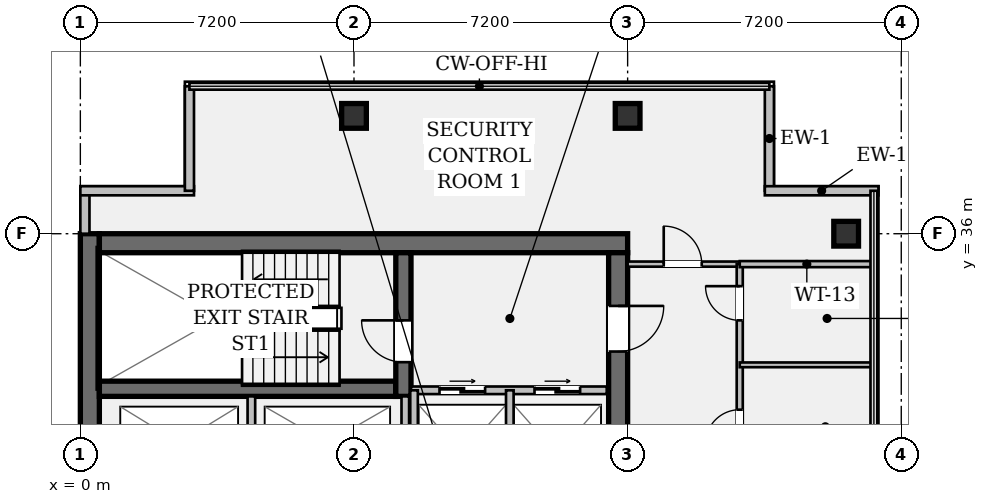
"""IFC4 building model, lengths in metres.
Left out: names, types, materials, properties, quantities, classifications, styles, units other than length and angle.
Written with IfcOpenShell. Run it as: python <this file> out.ifc"""

import sys

from ifc_helpers import new_model, si_unit, direction, frame, frame_2d, origin, origin_2d, place, context, subcontext, project, spatial, rectangle, hollow_rectangle, extrude, element, fill, save


model = new_model("IFC4")
c1 = context("Model", 3, precision=1e-05, world=origin(), true_north=direction((0.0, 1.0)))
c2 = subcontext(c1, "Body", "Model", "MODEL_VIEW")
j1 = project(units=[si_unit("LENGTHUNIT", "METRE"), si_unit("PLANEANGLEUNIT", "RADIAN")], contexts=[c1])
p1 = place(None, origin())
s1 = spatial("IfcSite", under=j1, at=p1, CompositionType="ELEMENT")
p2 = place(p1, origin())
s2 = spatial("IfcBuilding", under=s1, at=p2, CompositionType="ELEMENT")
p3 = place(p2, frame((0.0, 0.0, 241.15)))
s3 = spatial("IfcBuildingStorey", under=s2, at=p3, CompositionType="ELEMENT", Elevation=241.15)
p4 = place(p3, frame((0.25, 7.2, 0.0), z_axis=(0.0, 0.0, 1.0), x_axis=(0.0, 1.0, 0.0)))
e1 = element("IfcWall", 1, at=p4, inside=s3, PredefinedType="SHEAR", context=c2, shape_type="SweptSolid", body=[
    extrude(rectangle(XDim=28.8, YDim=0.5, at=frame_2d((14.4, 0.0))), origin(), (0.0, 0.0, 1.0), 3.24),
])
p5 = place(p3, frame((0.5, 35.75, 0.0), z_axis=(0.0, 0.0, 1.0), x_axis=(1.0, 0.0, 0.0)))
e2 = element("IfcWall", 2, at=p5, inside=s3, PredefinedType="SHEAR", context=c2, shape_type="SweptSolid", body=[
    extrude(rectangle(XDim=13.9, YDim=0.5, at=frame_2d((6.95, 0.0))), origin(), (0.0, 0.0, 1.0), 3.24),
])
p6 = place(p3, frame((14.15, 35.5, 0.0), z_axis=(0.0, 0.0, 1.0), x_axis=(0.0, -1.0, 0.0)))
e3 = element("IfcWall", 3, at=p6, inside=s3, PredefinedType="SHEAR", context=c2, shape_type="SweptSolid", body=[
    extrude(rectangle(XDim=27.8, YDim=0.5, at=frame_2d((13.9, 0.0))), origin(), (0.0, 0.0, 1.0), 3.24),
])
p7 = place(p6, frame((1.4, 0.0, 0.0)))
e4 = element("IfcOpeningElement", 4, at=p7, cuts=e3, PredefinedType="OPENING", context=c2, shape_type="SweptSolid", body=[
    extrude(rectangle(XDim=1.2, YDim=2.15, at=frame_2d((0.6, 1.075))), frame((0.0, 0.262, 0.0), z_axis=(0.0, -1.0, 0.0), x_axis=(1.0, 0.0, 0.0)), (0.0, 0.0, 1.0), 0.524),
])
p8 = place(p6, frame((25.35, 0.0, 0.0)))
e5 = element("IfcOpeningElement", 5, at=p8, cuts=e3, PredefinedType="OPENING", context=c2, shape_type="SweptSolid", body=[
    extrude(rectangle(XDim=1.2, YDim=2.15, at=frame_2d((0.6, 1.075))), frame((0.0, 0.262, 0.0), z_axis=(0.0, -1.0, 0.0), x_axis=(1.0, 0.0, 0.0)), (0.0, 0.0, 1.0), 0.524),
])
p9 = place(p6, frame((14.7, 0.0, 0.0)))
e6 = element("IfcOpeningElement", 6, at=p9, cuts=e3, PredefinedType="OPENING", context=c2, shape_type="SweptSolid", body=[
    extrude(rectangle(XDim=1.6, YDim=2.2, at=frame_2d((0.8, 1.1))), frame((0.0, 0.262, 0.0), z_axis=(0.0, -1.0, 0.0), x_axis=(1.0, 0.0, 0.0)), (0.0, 0.0, 1.0), 0.524),
])
p10 = place(p3, frame((0.5, 31.92, 0.0), z_axis=(0.0, 0.0, 1.0), x_axis=(1.0, 0.0, 0.0)))
e7 = element("IfcWall", 7, at=p10, inside=s3, PredefinedType="SHEAR", context=c2, shape_type="SweptSolid", body=[
    extrude(rectangle(XDim=7.8, YDim=0.4, at=frame_2d((3.9, 0.0))), origin(), (0.0, 0.0, 1.0), 3.24),
])
p11 = place(p3, frame((8.5, 31.72, 0.0), z_axis=(0.0, 0.0, 1.0), x_axis=(0.0, 1.0, 0.0)))
e8 = element("IfcWall", 8, at=p11, inside=s3, PredefinedType="SHEAR", context=c2, shape_type="SweptSolid", body=[
    extrude(rectangle(XDim=3.78, YDim=0.4, at=frame_2d((1.89, 0.0))), origin(), (0.0, 0.0, 1.0), 3.24),
])
p12 = place(p11, frame((0.9, 0.0, 0.0)))
e9 = element("IfcOpeningElement", 9, at=p12, cuts=e8, PredefinedType="OPENING", context=c2, shape_type="SweptSolid", body=[
    extrude(rectangle(XDim=1.1, YDim=2.15, at=frame_2d((0.55, 1.075))), frame((0.0, 0.212, 0.0), z_axis=(0.0, -1.0, 0.0), x_axis=(1.0, 0.0, 0.0)), (0.0, 0.0, 1.0), 0.424),
])
for number, where, z_axis, x_axis in (
    (10, (7.2, 39.1, 0.0), (0.0, 0.0, 1.0), (1.0, 0.0, 0.0)),
    (11, (14.4, 39.1, 0.0), (0.0, 0.0, 1.0), (1.0, 0.0, 0.0)),
    (12, (20.15, 36.0, 0.0), (0.0, 0.0, 1.0), (1.0, 0.0, 0.0)),
):
    element("IfcColumn", number, at=place(p3, frame(where, z_axis=z_axis, x_axis=x_axis)), inside=s3, PredefinedType="COLUMN", context=c2, shape_type="SweptSolid", body=[
        extrude(hollow_rectangle(XDim=0.65, YDim=0.65, WallThickness=0.04, at=origin_2d()), origin(), (0.0, 0.0, 1.0), 3.24),
    ])
p13 = place(p3, frame((0.12, 36.0, 0.0), z_axis=(0.0, 0.0, 1.0), x_axis=(0.0, 1.0, 0.0)))
e13 = element("IfcWall", 13, at=p13, inside=s3, PredefinedType="STANDARD", context=c2, shape_type="SweptSolid", body=[
    extrude(rectangle(XDim=1.13, YDim=0.24, at=frame_2d((0.565, 0.0))), origin(), (0.0, 0.0, 1.0), 3.24),
])
p14 = place(p3, frame((0.0, 37.13, 0.0), z_axis=(0.0, 0.0, 1.0), x_axis=(1.0, 0.0, 0.0)))
e14 = element("IfcWall", 14, at=p14, inside=s3, PredefinedType="STANDARD", context=c2, shape_type="SweptSolid", body=[
    extrude(rectangle(XDim=2.99, YDim=0.24, at=frame_2d((1.495, 0.0))), origin(), (0.0, 0.0, 1.0), 3.24),
])
for number, where, z_axis, x_axis in (
    (15, (2.87, 37.13, 0.0), (0.0, 0.0, 1.0), (0.0, 1.0, 0.0)),
    (16, (18.13, 39.88, 0.0), (0.0, 0.0, 1.0), (0.0, -1.0, 0.0)),
):
    element("IfcWall", number, at=place(p3, frame(where, z_axis=z_axis, x_axis=x_axis)), inside=s3, PredefinedType="STANDARD", context=c2, shape_type="SweptSolid", body=[
        extrude(rectangle(XDim=2.75, YDim=0.24, at=frame_2d((1.375, 0.0))), origin(), (0.0, 0.0, 1.0), 3.24),
    ])
p15 = place(p3, frame((18.01, 37.13, 0.0), z_axis=(0.0, 0.0, 1.0), x_axis=(1.0, 0.0, 0.0)))
e17 = element("IfcWall", 17, at=p15, inside=s3, PredefinedType="STANDARD", context=c2, shape_type="SweptSolid", body=[
    extrude(rectangle(XDim=2.99, YDim=0.24, at=frame_2d((1.495, 0.0))), origin(), (0.0, 0.0, 1.0), 3.24),
])
p16 = place(p3, frame((8.7, 31.88, 0.0), z_axis=(0.0, 0.0, 1.0), x_axis=(1.0, 0.0, 0.0)))
e18 = element("IfcWall", 18, at=p16, inside=s3, PredefinedType="PARTITIONING", context=c2, shape_type="SweptSolid", body=[
    extrude(rectangle(XDim=5.15, YDim=0.2, at=frame_2d((2.575, 0.0))), origin(), (0.0, 0.0, 1.0), 3.24),
])
p17 = place(p16, frame((0.75, 0.0, 0.0)))
e19 = element("IfcOpeningElement", 19, at=p17, cuts=e18, PredefinedType="OPENING", context=c2, shape_type="SweptSolid", body=[
    extrude(rectangle(XDim=1.2, YDim=2.2, at=frame_2d((0.6, 1.1))), frame((0.0, 0.112, 0.0), z_axis=(0.0, -1.0, 0.0), x_axis=(1.0, 0.0, 0.0)), (0.0, 0.0, 1.0), 0.224),
])
p18 = place(p16, frame((3.25, 0.0, 0.0)))
e20 = element("IfcOpeningElement", 20, at=p18, cuts=e18, PredefinedType="OPENING", context=c2, shape_type="SweptSolid", body=[
    extrude(rectangle(XDim=1.2, YDim=2.2, at=frame_2d((0.6, 1.1))), frame((0.0, 0.112, 0.0), z_axis=(0.0, -1.0, 0.0), x_axis=(1.0, 0.0, 0.0)), (0.0, 0.0, 1.0), 0.224),
])
for number, where, z_axis, x_axis in (
    (21, (8.78, 28.78, 0.0), (0.0, 0.0, 1.0), (0.0, 1.0, 0.0)),
    (22, (11.3, 28.78, 0.0), (0.0, 0.0, 1.0), (0.0, 1.0, 0.0)),
):
    element("IfcWall", number, at=place(p3, frame(where, z_axis=z_axis, x_axis=x_axis)), inside=s3, PredefinedType="PARTITIONING", context=c2, shape_type="SweptSolid", body=[
        extrude(rectangle(XDim=3.1, YDim=0.2, at=frame_2d((1.55, 0.0))), origin(), (0.0, 0.0, 1.0), 3.24),
    ])
for number, where, z_axis, x_axis in (
    (23, (4.5, 28.78, 0.0), (0.0, 0.0, 1.0), (0.0, 1.0, 0.0)),
    (24, (8.55, 28.78, 0.0), (0.0, 0.0, 1.0), (0.0, 1.0, 0.0)),
):
    element("IfcWall", number, at=place(p3, frame(where, z_axis=z_axis, x_axis=x_axis)), inside=s3, PredefinedType="PARTITIONING", context=c2, shape_type="SweptSolid", body=[
        extrude(rectangle(XDim=2.94, YDim=0.2, at=frame_2d((1.47, 0.0))), origin(), (0.0, 0.0, 1.0), 3.24),
    ])
p19 = place(p3, frame((14.4, 35.2, 0.0), z_axis=(0.0, 0.0, 1.0), x_axis=(1.0, 0.0, 0.0)))
e25 = element("IfcWall", 25, at=p19, inside=s3, PredefinedType="PARTITIONING", context=c2, shape_type="SweptSolid", body=[
    extrude(rectangle(XDim=2.95, YDim=0.135, at=frame_2d((1.475, 0.0))), origin(), (0.0, 0.0, 1.0), 2.808),
])
p20 = place(p19, frame((0.95, 0.0, 0.0)))
e26 = element("IfcOpeningElement", 26, at=p20, cuts=e25, PredefinedType="OPENING", context=c2, shape_type="SweptSolid", body=[
    extrude(rectangle(XDim=1.0, YDim=2.15, at=frame_2d((0.5, 1.075))), frame((0.0, 0.08, 0.0), z_axis=(0.0, -1.0, 0.0), x_axis=(1.0, 0.0, 0.0)), (0.0, 0.0, 1.0), 0.159),
])
p21 = place(p3, frame((17.35, 12.35, 0.0), z_axis=(0.0, 0.0, 1.0), x_axis=(0.0, 1.0, 0.0)))
e27 = element("IfcWall", 27, at=p21, inside=s3, PredefinedType="PARTITIONING", context=c2, shape_type="SweptSolid", body=[
    extrude(rectangle(XDim=22.85, YDim=0.16, at=frame_2d((11.425, 0.0))), origin(), (0.0, 0.0, 1.0), 2.676),
])
p22 = place(p21, frame((11.63, 0.0, 0.0)))
e28 = element("IfcOpeningElement", 28, at=p22, cuts=e27, PredefinedType="OPENING", context=c2, shape_type="SweptSolid", body=[
    extrude(rectangle(XDim=0.9, YDim=2.15, at=frame_2d((0.45, 1.075))), frame((0.0, 0.092, 0.0), z_axis=(0.0, -1.0, 0.0), x_axis=(1.0, 0.0, 0.0)), (0.0, 0.0, 1.0), 0.184),
])
p23 = place(p21, frame((14.88, 0.0, 0.0)))
e29 = element("IfcOpeningElement", 29, at=p23, cuts=e27, PredefinedType="OPENING", context=c2, shape_type="SweptSolid", body=[
    extrude(rectangle(XDim=0.9, YDim=2.15, at=frame_2d((0.45, 1.075))), frame((0.0, 0.092, 0.0), z_axis=(0.0, -1.0, 0.0), x_axis=(1.0, 0.0, 0.0)), (0.0, 0.0, 1.0), 0.184),
])
p24 = place(p21, frame((18.12, 0.0, 0.0)))
e30 = element("IfcOpeningElement", 30, at=p24, cuts=e27, PredefinedType="OPENING", context=c2, shape_type="SweptSolid", body=[
    extrude(rectangle(XDim=0.9, YDim=2.15, at=frame_2d((0.45, 1.075))), frame((0.0, 0.092, 0.0), z_axis=(0.0, -1.0, 0.0), x_axis=(1.0, 0.0, 0.0)), (0.0, 0.0, 1.0), 0.184),
])
p25 = place(p21, frame((21.37, 0.0, 0.0)))
e31 = element("IfcOpeningElement", 31, at=p25, cuts=e27, PredefinedType="OPENING", context=c2, shape_type="SweptSolid", body=[
    extrude(rectangle(XDim=0.9, YDim=2.15, at=frame_2d((0.45, 1.075))), frame((0.0, 0.092, 0.0), z_axis=(0.0, -1.0, 0.0), x_axis=(1.0, 0.0, 0.0)), (0.0, 0.0, 1.0), 0.184),
])
p26 = place(p3, frame((17.35, 35.2, 0.0), z_axis=(0.0, 0.0, 1.0), x_axis=(1.0, 0.0, 0.0)))
e32 = element("IfcWall", 32, at=p26, inside=s3, PredefinedType="PARTITIONING", context=c2, shape_type="SweptSolid", body=[
    extrude(rectangle(XDim=3.53, YDim=0.16, at=frame_2d((1.765, 0.0))), origin(), (0.0, 0.0, 1.0), 2.808),
])
p27 = place(p3, frame((20.9, 22.7, 0.0), z_axis=(0.0, 0.0, 1.0), x_axis=(0.0, 1.0, 0.0)))
e33 = element("IfcWall", 33, at=p27, inside=s3, PredefinedType="PARTITIONING", context=c2, shape_type="SweptSolid", body=[
    extrude(rectangle(XDim=12.5, YDim=0.135, at=frame_2d((6.25, 0.0))), origin(), (0.0, 0.0, 1.0), 3.24),
])
p28 = place(p3, frame((17.35, 32.55, 0.0), z_axis=(0.0, 0.0, 1.0), x_axis=(1.0, 0.0, 0.0)))
e34 = element("IfcWall", 34, at=p28, inside=s3, PredefinedType="PARTITIONING", context=c2, shape_type="SweptSolid", body=[
    extrude(rectangle(XDim=3.55, YDim=0.125, at=frame_2d((1.775, 0.0))), origin(), (0.0, 0.0, 1.0), 2.808),
])
p29 = place(p12, origin())
e35 = element("IfcDoor", 35, at=p29, inside=s3, OperationType="SINGLE_SWING_RIGHT", PredefinedType="DOOR", context=c2, shape_type="SweptSolid", body=[
    extrude(rectangle(XDim=1.1, YDim=2.15, at=frame_2d((0.55, 1.075))), frame((0.0, 0.025, 0.0), z_axis=(0.0, -1.0, 0.0), x_axis=(1.0, 0.0, 0.0)), (0.0, 0.0, 1.0), 0.05),
])
fill(e9, e35)
p30 = place(p7, origin())
e36 = element("IfcDoor", 36, at=p30, inside=s3, OperationType="SINGLE_SWING_LEFT", PredefinedType="DOOR", context=c2, shape_type="SweptSolid", body=[
    extrude(rectangle(XDim=1.2, YDim=2.15, at=frame_2d((0.6, 1.075))), frame((0.0, 0.025, 0.0), z_axis=(0.0, -1.0, 0.0), x_axis=(1.0, 0.0, 0.0)), (0.0, 0.0, 1.0), 0.05),
])
fill(e4, e36)
p31 = place(p17, origin())
e37 = element("IfcDoor", 37, at=p31, inside=s3, OperationType="DOUBLE_DOOR_SLIDING", PredefinedType="DOOR", context=c2, shape_type="SweptSolid", body=[
    extrude(rectangle(XDim=1.2, YDim=2.2, at=frame_2d((0.6, 1.1))), frame((0.0, 0.025, 0.0), z_axis=(0.0, -1.0, 0.0), x_axis=(1.0, 0.0, 0.0)), (0.0, 0.0, 1.0), 0.05),
])
fill(e19, e37)
p32 = place(p18, origin())
e38 = element("IfcDoor", 38, at=p32, inside=s3, OperationType="DOUBLE_DOOR_SLIDING", PredefinedType="DOOR", context=c2, shape_type="SweptSolid", body=[
    extrude(rectangle(XDim=1.2, YDim=2.2, at=frame_2d((0.6, 1.1))), frame((0.0, 0.025, 0.0), z_axis=(0.0, -1.0, 0.0), x_axis=(1.0, 0.0, 0.0)), (0.0, 0.0, 1.0), 0.05),
])
fill(e20, e38)
p33 = place(p20, origin())
e39 = element("IfcDoor", 39, at=p33, inside=s3, OperationType="SINGLE_SWING_LEFT", PredefinedType="DOOR", context=c2, shape_type="SweptSolid", body=[
    extrude(rectangle(XDim=1.0, YDim=2.15, at=frame_2d((0.5, 1.075))), frame((0.0, 0.025, 0.0), z_axis=(0.0, -1.0, 0.0), x_axis=(1.0, 0.0, 0.0)), (0.0, 0.0, 1.0), 0.05),
])
fill(e26, e39)
p34 = place(p24, origin())
e40 = element("IfcDoor", 40, at=p34, inside=s3, OperationType="SINGLE_SWING_LEFT", PredefinedType="DOOR", context=c2, shape_type="SweptSolid", body=[
    extrude(rectangle(XDim=0.9, YDim=2.15, at=frame_2d((0.45, 1.075))), frame((0.0, 0.025, 0.0), z_axis=(0.0, -1.0, 0.0), x_axis=(1.0, 0.0, 0.0)), (0.0, 0.0, 1.0), 0.05),
])
fill(e30, e40)
p35 = place(p25, origin())
e41 = element("IfcDoor", 41, at=p35, inside=s3, OperationType="SINGLE_SWING_RIGHT", PredefinedType="DOOR", context=c2, shape_type="SweptSolid", body=[
    extrude(rectangle(XDim=0.9, YDim=2.15, at=frame_2d((0.45, 1.075))), frame((0.0, 0.025, 0.0), z_axis=(0.0, -1.0, 0.0), x_axis=(1.0, 0.0, 0.0)), (0.0, 0.0, 1.0), 0.05),
])
fill(e31, e41)
save(model, sys.argv[1])
